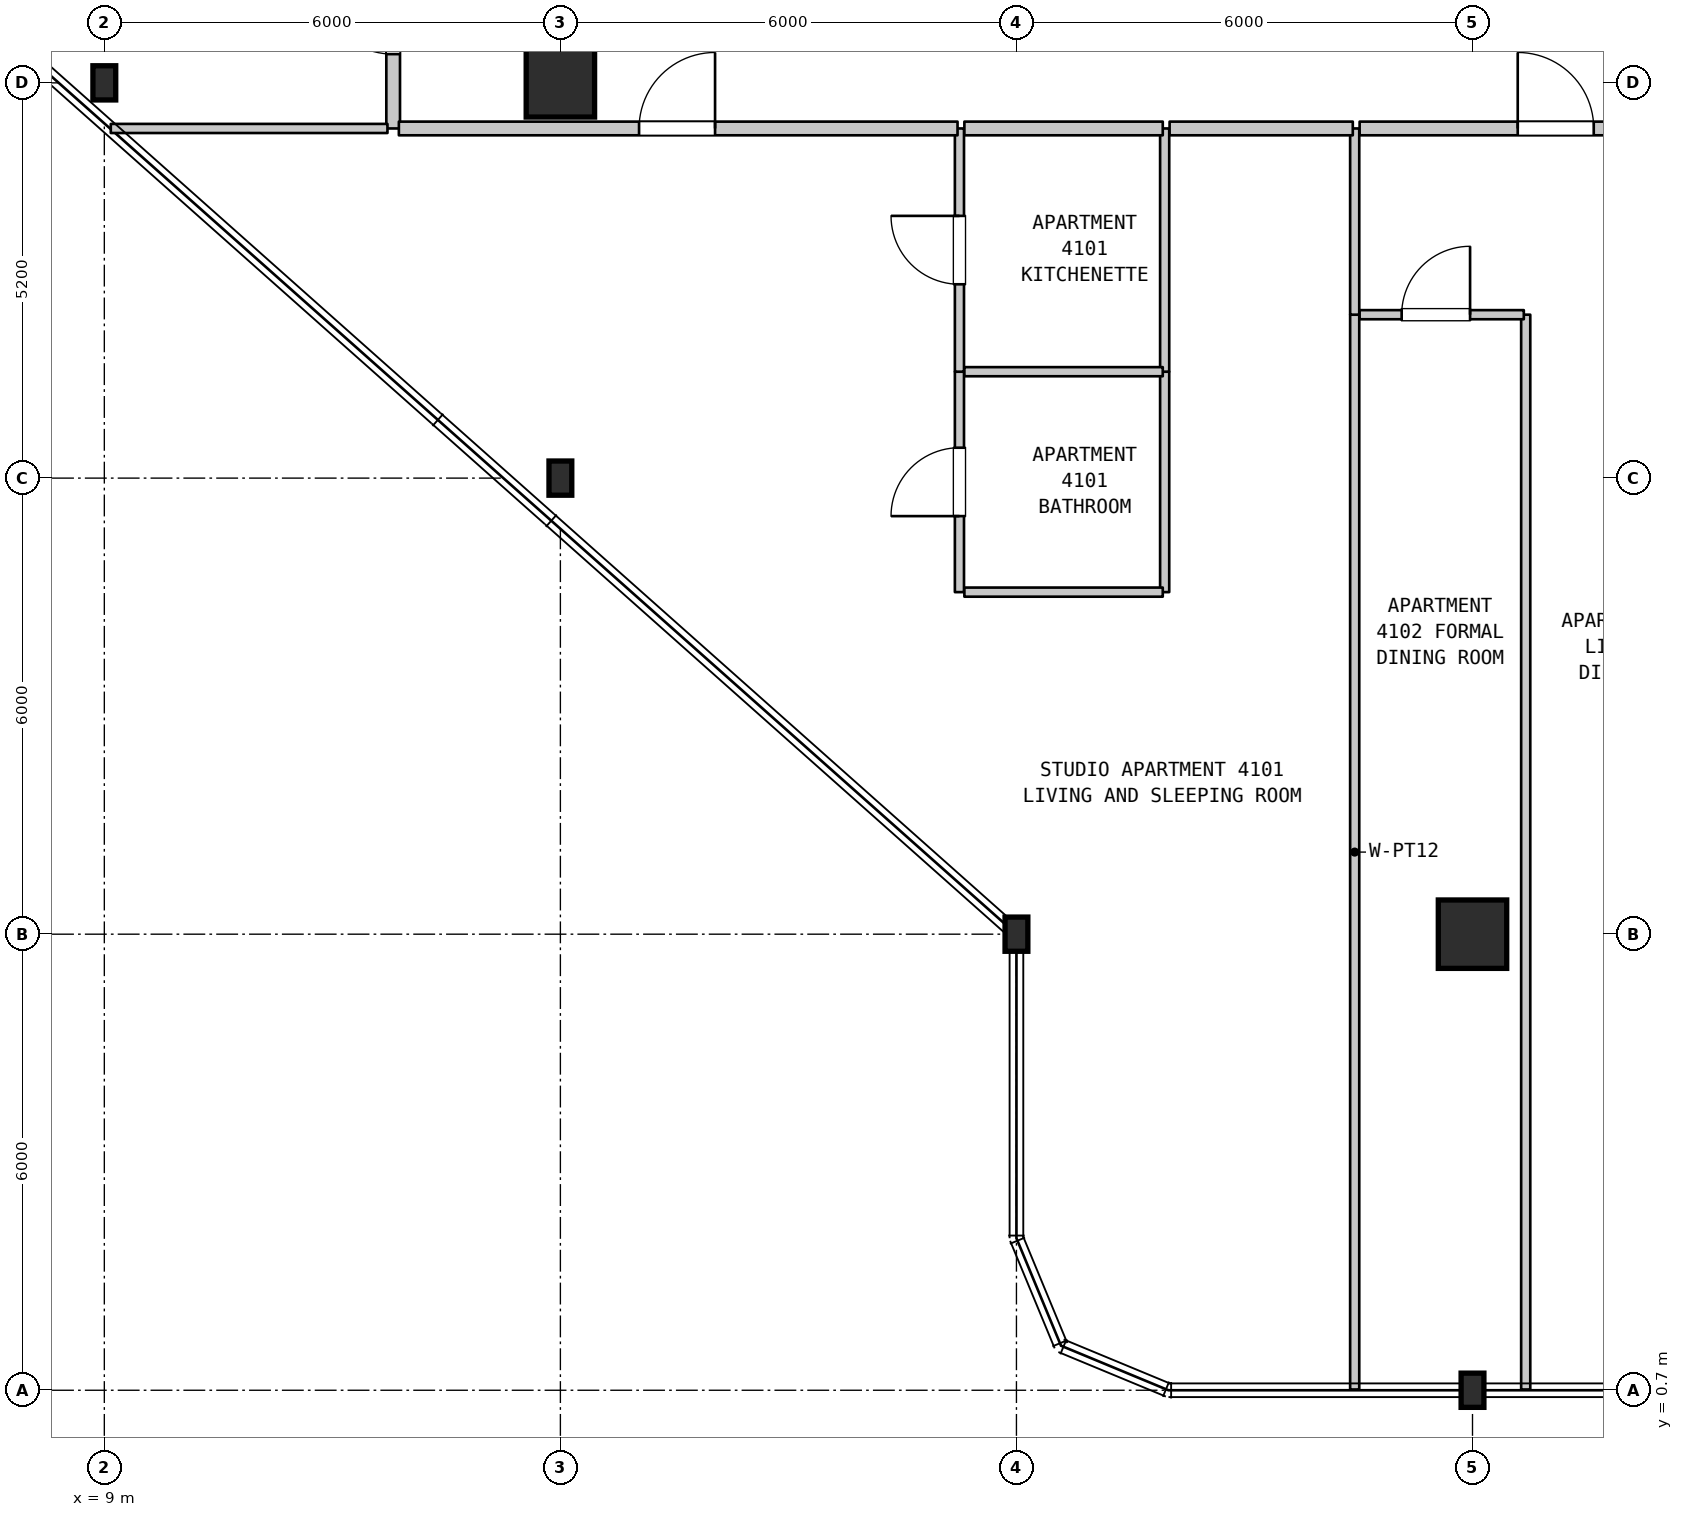
"""IFC4 building model, lengths in metres.
Left out: names, types, materials, properties, quantities, classifications, styles, units other than length and angle.
Written with IfcOpenShell. Run it as: python <this file> out.ifc"""

import sys

from ifc_helpers import new_model, si_unit, direction, frame, frame_2d, origin, origin_2d, place, context, subcontext, project, spatial, rectangle, i_section, extrude, element, fill, save


model = new_model("IFC4")
c1 = context("Model", 3, precision=1e-05, world=origin(), true_north=direction((0.0, 1.0)))
c2 = subcontext(c1, "Body", "Model", "MODEL_VIEW")
j1 = project(units=[si_unit("LENGTHUNIT", "METRE"), si_unit("PLANEANGLEUNIT", "RADIAN")], contexts=[c1])
p1 = place(None, origin())
s1 = spatial("IfcSite", under=j1, at=p1, CompositionType="ELEMENT")
p2 = place(p1, origin())
s2 = spatial("IfcBuilding", under=s1, at=p2, CompositionType="ELEMENT")
p3 = place(p2, frame((0.0, 0.0, 169.1)))
s3 = spatial("IfcBuildingStorey", under=s2, at=p3, CompositionType="ELEMENT", Elevation=169.1)
for number, where, z_axis, x_axis in (
    (1, (9.0, 17.9, 0.0), (0.0, 0.0, 1.0), (1.0, 0.0, 0.0)),
    (2, (15.0, 12.7, 0.0), (0.0, 0.0, 1.0), (1.0, 0.0, 0.0)),
):
    element("IfcColumn", number, at=place(p3, frame(where, z_axis=z_axis, x_axis=x_axis)), inside=s3, PredefinedType="COLUMN", context=c2, shape_type="SweptSolid", body=[
        extrude(i_section(OverallWidth=0.3, OverallDepth=0.45, WebThickness=0.014, FlangeThickness=0.026, FilletRadius=0.027, at=origin_2d()), origin(), (0.0, 0.0, 1.0), 3.7),
    ])
p4 = place(p3, frame((15.0, 17.9, 0.0), z_axis=(0.0, 0.0, 1.0), x_axis=(1.0, 0.0, 0.0)))
e3 = element("IfcColumn", 3, at=p4, inside=s3, PredefinedType="COLUMN", context=c2, shape_type="SweptSolid", body=[
    extrude(rectangle(XDim=0.9, YDim=0.9, at=origin_2d()), origin(), (0.0, 0.0, 1.0), 3.7),
])
for number, where, z_axis, x_axis in (
    (4, (21.0, 6.7, 0.0), (0.0, 0.0, 1.0), (1.0, 0.0, 0.0)),
    (5, (27.0, 0.7, 0.0), (0.0, 0.0, 1.0), (1.0, 0.0, 0.0)),
):
    element("IfcColumn", number, at=place(p3, frame(where, z_axis=z_axis, x_axis=x_axis)), inside=s3, PredefinedType="COLUMN", context=c2, shape_type="SweptSolid", body=[
        extrude(i_section(OverallWidth=0.3, OverallDepth=0.45, WebThickness=0.014, FlangeThickness=0.026, FilletRadius=0.027, at=origin_2d()), origin(), (0.0, 0.0, 1.0), 3.7),
    ])
p5 = place(p3, frame((27.0, 6.7, 0.0), z_axis=(0.0, 0.0, 1.0), x_axis=(1.0, 0.0, 0.0)))
e6 = element("IfcColumn", 6, at=p5, inside=s3, PredefinedType="COLUMN", context=c2, shape_type="SweptSolid", body=[
    extrude(rectangle(XDim=0.9, YDim=0.9, at=origin_2d()), origin(), (0.0, 0.0, 1.0), 3.7),
])
p6 = place(p3, frame((12.8, 17.3, 0.0), z_axis=(0.0, 0.0, 1.0), x_axis=(0.0, 1.0, 0.0)))
e7 = element("IfcWall", 7, at=p6, inside=s3, PredefinedType="STANDARD", context=c2, shape_type="SweptSolid", body=[
    extrude(rectangle(XDim=3.1, YDim=0.18, at=frame_2d((1.55, 0.0))), origin(), (0.0, 0.0, 1.0), 3.39),
])
p7 = place(p6, frame((0.978, 0.0, 0.0)))
e8 = element("IfcOpeningElement", 8, at=p7, cuts=e7, PredefinedType="OPENING", context=c2, shape_type="SweptSolid", body=[
    extrude(rectangle(XDim=1.0, YDim=2.15, at=frame_2d((0.5, 1.075))), frame((0.0, 0.1, 0.0), z_axis=(0.0, -1.0, 0.0), x_axis=(1.0, 0.0, 0.0)), (0.0, 0.0, 1.0), 0.2),
])
p8 = place(p3, frame((20.25, 11.2, 0.0), z_axis=(0.0, 0.0, 1.0), x_axis=(0.0, 1.0, 0.0)))
e9 = element("IfcWall", 9, at=p8, inside=s3, PredefinedType="PARTITIONING", context=c2, shape_type="SweptSolid", body=[
    extrude(rectangle(XDim=2.9, YDim=0.12, at=frame_2d((1.45, 0.0))), origin(), (0.0, 0.0, 1.0), 3.39),
])
p9 = place(p8, frame((1.0, 0.0, 0.0)))
e10 = element("IfcOpeningElement", 10, at=p9, cuts=e9, PredefinedType="OPENING", context=c2, shape_type="SweptSolid", body=[
    extrude(rectangle(XDim=0.9, YDim=2.1, at=frame_2d((0.45, 1.05))), frame((0.0, 0.07, 0.0), z_axis=(0.0, -1.0, 0.0), x_axis=(1.0, 0.0, 0.0)), (0.0, 0.0, 1.0), 0.14),
])
p10 = place(p3, frame((20.25, 14.1, 0.0), z_axis=(0.0, 0.0, 1.0), x_axis=(0.0, 1.0, 0.0)))
e11 = element("IfcWall", 11, at=p10, inside=s3, PredefinedType="PARTITIONING", context=c2, shape_type="SweptSolid", body=[
    extrude(rectangle(XDim=3.2, YDim=0.12, at=frame_2d((1.6, 0.0))), origin(), (0.0, 0.0, 1.0), 3.39),
])
p11 = place(p10, frame((1.15, 0.0, 0.0)))
e12 = element("IfcOpeningElement", 12, at=p11, cuts=e11, PredefinedType="OPENING", context=c2, shape_type="SweptSolid", body=[
    extrude(rectangle(XDim=0.9, YDim=2.15, at=frame_2d((0.45, 1.075))), frame((0.0, 0.07, 0.0), z_axis=(0.0, -1.0, 0.0), x_axis=(1.0, 0.0, 0.0)), (0.0, 0.0, 1.0), 0.14),
])
p12 = place(p3, frame((22.95, 11.2, 0.0), z_axis=(0.0, 0.0, 1.0), x_axis=(0.0, 1.0, 0.0)))
e13 = element("IfcWall", 13, at=p12, inside=s3, PredefinedType="PARTITIONING", context=c2, shape_type="SweptSolid", body=[
    extrude(rectangle(XDim=2.9, YDim=0.12, at=frame_2d((1.45, 0.0))), origin(), (0.0, 0.0, 1.0), 3.39),
])
p13 = place(p3, frame((22.95, 14.1, 0.0), z_axis=(0.0, 0.0, 1.0), x_axis=(0.0, 1.0, 0.0)))
e14 = element("IfcWall", 14, at=p13, inside=s3, PredefinedType="PARTITIONING", context=c2, shape_type="SweptSolid", body=[
    extrude(rectangle(XDim=3.2, YDim=0.12, at=frame_2d((1.6, 0.0))), origin(), (0.0, 0.0, 1.0), 3.39),
])
p14 = place(p3, frame((25.45, 0.71, 0.0), z_axis=(0.0, 0.0, 1.0), x_axis=(0.0, 1.0, 0.0)))
e15 = element("IfcWall", 15, at=p14, inside=s3, PredefinedType="PARTITIONING", context=c2, shape_type="SweptSolid", body=[
    extrude(rectangle(XDim=14.14, YDim=0.12, at=frame_2d((7.07, 0.0))), origin(), (0.0, 0.0, 1.0), 3.39),
])
p15 = place(p3, frame((25.45, 14.85, 0.0), z_axis=(0.0, 0.0, 1.0), x_axis=(0.0, 1.0, 0.0)))
e16 = element("IfcWall", 16, at=p15, inside=s3, PredefinedType="PARTITIONING", context=c2, shape_type="SweptSolid", body=[
    extrude(rectangle(XDim=2.45, YDim=0.12, at=frame_2d((1.225, 0.0))), origin(), (0.0, 0.0, 1.0), 3.39),
])
p16 = place(p3, frame((27.7, 0.71, 0.0), z_axis=(0.0, 0.0, 1.0), x_axis=(0.0, 1.0, 0.0)))
e17 = element("IfcWall", 17, at=p16, inside=s3, PredefinedType="PARTITIONING", context=c2, shape_type="SweptSolid", body=[
    extrude(rectangle(XDim=14.14, YDim=0.12, at=frame_2d((7.07, 0.0))), origin(), (0.0, 0.0, 1.0), 3.39),
])
for number, where, z_axis, x_axis in (
    (18, (20.315, 11.2, 0.0), (0.0, 0.0, 1.0), (1.0, 0.0, 0.0)),
    (19, (20.315, 14.1, 0.0), (0.0, 0.0, 1.0), (1.0, 0.0, 0.0)),
):
    element("IfcWall", number, at=place(p3, frame(where, z_axis=z_axis, x_axis=x_axis)), inside=s3, PredefinedType="PARTITIONING", context=c2, shape_type="SweptSolid", body=[
        extrude(rectangle(XDim=2.61, YDim=0.12, at=frame_2d((1.305, 0.0))), origin(), (0.0, 0.0, 1.0), 3.39),
    ])
p17 = place(p3, frame((25.515, 14.85, 0.0), z_axis=(0.0, 0.0, 1.0), x_axis=(1.0, 0.0, 0.0)))
e20 = element("IfcWall", 20, at=p17, inside=s3, PredefinedType="PARTITIONING", context=c2, shape_type="SweptSolid", body=[
    extrude(rectangle(XDim=2.16, YDim=0.12, at=frame_2d((1.08, 0.0))), origin(), (0.0, 0.0, 1.0), 3.39),
])
p18 = place(p17, frame((0.553, 0.0, 0.0)))
e21 = element("IfcOpeningElement", 21, at=p18, cuts=e20, PredefinedType="OPENING", context=c2, shape_type="SweptSolid", body=[
    extrude(rectangle(XDim=0.9, YDim=2.15, at=frame_2d((0.45, 1.075))), frame((0.0, 0.07, 0.0), z_axis=(0.0, -1.0, 0.0), x_axis=(1.0, 0.0, 0.0)), (0.0, 0.0, 1.0), 0.14),
])
p19 = place(p3, frame((9.085, 17.3, 0.0), z_axis=(0.0, 0.0, 1.0), x_axis=(1.0, 0.0, 0.0)))
e22 = element("IfcWall", 22, at=p19, inside=s3, PredefinedType="PARTITIONING", context=c2, shape_type="SweptSolid", body=[
    extrude(rectangle(XDim=3.64, YDim=0.12, at=frame_2d((1.82, 0.0))), origin(), (0.0, 0.0, 1.0), 3.39),
])
p20 = place(p3, frame((12.875, 17.3, 0.0), z_axis=(0.0, 0.0, 1.0), x_axis=(1.0, 0.0, 0.0)))
e23 = element("IfcWall", 23, at=p20, inside=s3, PredefinedType="STANDARD", context=c2, shape_type="SweptSolid", body=[
    extrude(rectangle(XDim=7.35, YDim=0.18, at=frame_2d((3.675, 0.0))), origin(), (0.0, 0.0, 1.0), 3.39),
])
p21 = place(p20, frame((3.16, 0.0, 0.0)))
e24 = element("IfcOpeningElement", 24, at=p21, cuts=e23, PredefinedType="OPENING", context=c2, shape_type="SweptSolid", body=[
    extrude(rectangle(XDim=1.0, YDim=2.15, at=frame_2d((0.5, 1.075))), frame((0.0, 0.1, 0.0), z_axis=(0.0, -1.0, 0.0), x_axis=(1.0, 0.0, 0.0)), (0.0, 0.0, 1.0), 0.2),
])
p22 = place(p3, frame((20.315, 17.3, 0.0), z_axis=(0.0, 0.0, 1.0), x_axis=(1.0, 0.0, 0.0)))
e25 = element("IfcWall", 25, at=p22, inside=s3, PredefinedType="STANDARD", context=c2, shape_type="SweptSolid", body=[
    extrude(rectangle(XDim=2.61, YDim=0.18, at=frame_2d((1.305, 0.0))), origin(), (0.0, 0.0, 1.0), 3.39),
])
p23 = place(p3, frame((23.015, 17.3, 0.0), z_axis=(0.0, 0.0, 1.0), x_axis=(1.0, 0.0, 0.0)))
e26 = element("IfcWall", 26, at=p23, inside=s3, PredefinedType="STANDARD", context=c2, shape_type="SweptSolid", body=[
    extrude(rectangle(XDim=2.41, YDim=0.18, at=frame_2d((1.205, 0.0))), origin(), (0.0, 0.0, 1.0), 3.39),
])
p24 = place(p3, frame((25.515, 17.3, 0.0), z_axis=(0.0, 0.0, 1.0), x_axis=(1.0, 0.0, 0.0)))
e27 = element("IfcWall", 27, at=p24, inside=s3, PredefinedType="STANDARD", context=c2, shape_type="SweptSolid", body=[
    extrude(rectangle(XDim=5.095, YDim=0.18, at=frame_2d((2.548, 0.0))), origin(), (0.0, 0.0, 1.0), 3.39),
])
p25 = place(p24, frame((2.08, 0.0, 0.0)))
e28 = element("IfcOpeningElement", 28, at=p25, cuts=e27, PredefinedType="OPENING", context=c2, shape_type="SweptSolid", body=[
    extrude(rectangle(XDim=1.0, YDim=2.15, at=frame_2d((0.5, 1.075))), frame((0.0, 0.1, 0.0), z_axis=(0.0, -1.0, 0.0), x_axis=(1.0, 0.0, 0.0)), (0.0, 0.0, 1.0), 0.2),
])
p26 = place(p7, origin())
e29 = element("IfcDoor", 29, at=p26, inside=s3, OperationType="SINGLE_SWING_RIGHT", PredefinedType="DOOR", context=c2, shape_type="SweptSolid", body=[
    extrude(rectangle(XDim=1.0, YDim=2.15, at=frame_2d((0.5, 1.075))), frame((0.0, 0.025, 0.0), z_axis=(0.0, -1.0, 0.0), x_axis=(1.0, 0.0, 0.0)), (0.0, 0.0, 1.0), 0.05),
])
fill(e8, e29)
p27 = place(p9, origin())
e30 = element("IfcDoor", 30, at=p27, inside=s3, OperationType="SINGLE_SWING_LEFT", PredefinedType="DOOR", context=c2, shape_type="SweptSolid", body=[
    extrude(rectangle(XDim=0.9, YDim=2.1, at=frame_2d((0.45, 1.05))), frame((0.0, 0.025, 0.0), z_axis=(0.0, -1.0, 0.0), x_axis=(1.0, 0.0, 0.0)), (0.0, 0.0, 1.0), 0.05),
])
fill(e10, e30)
p28 = place(p11, origin())
e31 = element("IfcDoor", 31, at=p28, inside=s3, OperationType="SINGLE_SWING_RIGHT", PredefinedType="DOOR", context=c2, shape_type="SweptSolid", body=[
    extrude(rectangle(XDim=0.9, YDim=2.15, at=frame_2d((0.45, 1.075))), frame((0.0, 0.025, 0.0), z_axis=(0.0, -1.0, 0.0), x_axis=(1.0, 0.0, 0.0)), (0.0, 0.0, 1.0), 0.05),
])
fill(e12, e31)
p29 = place(p18, origin())
e32 = element("IfcDoor", 32, at=p29, inside=s3, OperationType="SINGLE_SWING_RIGHT", PredefinedType="DOOR", context=c2, shape_type="SweptSolid", body=[
    extrude(rectangle(XDim=0.9, YDim=2.15, at=frame_2d((0.45, 1.075))), frame((0.0, 0.025, 0.0), z_axis=(0.0, -1.0, 0.0), x_axis=(1.0, 0.0, 0.0)), (0.0, 0.0, 1.0), 0.05),
])
fill(e21, e32)
p30 = place(p21, origin())
e33 = element("IfcDoor", 33, at=p30, inside=s3, OperationType="SINGLE_SWING_RIGHT", PredefinedType="DOOR", context=c2, shape_type="SweptSolid", body=[
    extrude(rectangle(XDim=1.0, YDim=2.15, at=frame_2d((0.5, 1.075))), frame((0.0, 0.025, 0.0), z_axis=(0.0, -1.0, 0.0), x_axis=(1.0, 0.0, 0.0)), (0.0, 0.0, 1.0), 0.05),
])
fill(e24, e33)
p31 = place(p25, origin())
e34 = element("IfcDoor", 34, at=p31, inside=s3, OperationType="SINGLE_SWING_LEFT", PredefinedType="DOOR", context=c2, shape_type="SweptSolid", body=[
    extrude(rectangle(XDim=1.0, YDim=2.15, at=frame_2d((0.5, 1.075))), frame((0.0, 0.025, 0.0), z_axis=(0.0, -1.0, 0.0), x_axis=(1.0, 0.0, 0.0)), (0.0, 0.0, 1.0), 0.05),
])
fill(e28, e34)
save(model, sys.argv[1])
